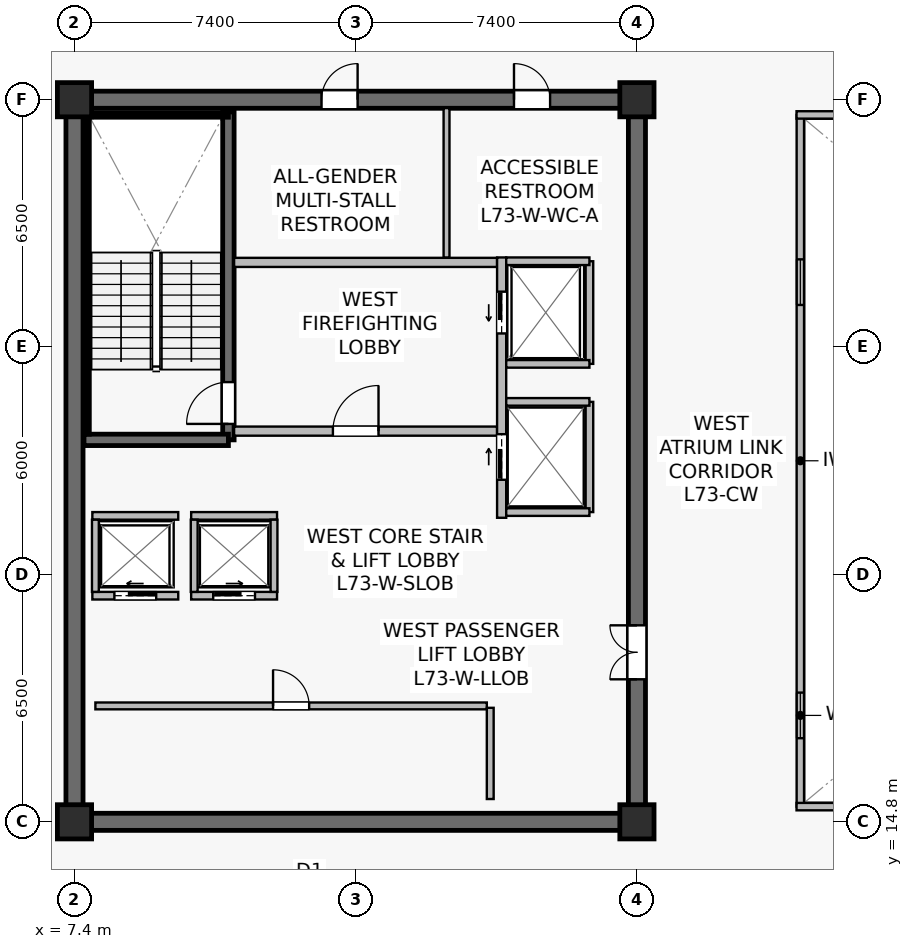
"""IFC4 building model, lengths in metres.
Left out: names, types, materials, properties, quantities, classifications, styles, units other than length and angle.
Written with IfcOpenShell. Run it as: python <this file> out.ifc"""

import sys

from ifc_helpers import new_model, si_unit, direction, frame, frame_2d, origin, origin_2d, place, context, subcontext, project, spatial, rectangle, extrude, source, transform, mapped, element, fill, save


model = new_model("IFC4")
c1 = context("Model", 3, precision=1e-05, world=origin(), true_north=direction((0.0, 1.0)))
c2 = subcontext(c1, "Body", "Model", "MODEL_VIEW")
j1 = project(units=[si_unit("LENGTHUNIT", "METRE"), si_unit("PLANEANGLEUNIT", "RADIAN")], contexts=[c1])
p1 = place(None, origin())
s1 = spatial("IfcSite", under=j1, at=p1, CompositionType="ELEMENT")
p2 = place(p1, origin())
s2 = spatial("IfcBuilding", under=s1, at=p2, CompositionType="ELEMENT")
p3 = place(p2, frame((0.0, 0.0, 306.0)))
s3 = spatial("IfcBuildingStorey", under=s2, at=p3, CompositionType="ELEMENT", Elevation=306.0)
p4 = place(p3, frame((7.175, 14.8, 0.0), z_axis=(0.0, 0.0, 1.0), x_axis=(1.0, 0.0, 0.0)))
e1 = element("IfcWall", 1, at=p4, inside=s3, PredefinedType="SHEAR", context=c2, shape_type="SweptSolid", body=[
    extrude(rectangle(XDim=15.25, YDim=0.45, at=frame_2d((7.625, 0.0))), origin(), (0.0, 0.0, 1.0), 3.9),
])
p5 = place(p3, frame((7.175, 33.8, 0.0), z_axis=(0.0, 0.0, 1.0), x_axis=(1.0, 0.0, 0.0)))
e2 = element("IfcWall", 2, at=p5, inside=s3, PredefinedType="SHEAR", context=c2, shape_type="SweptSolid", body=[
    extrude(rectangle(XDim=15.25, YDim=0.45, at=frame_2d((7.625, 0.0))), origin(), (0.0, 0.0, 1.0), 3.9),
])
p6 = place(p5, frame((6.725, 0.0, 0.0)))
e3 = element("IfcOpeningElement", 3, at=p6, cuts=e2, PredefinedType="OPENING", context=c2, shape_type="SweptSolid", body=[
    extrude(rectangle(XDim=0.95, YDim=2.15, at=frame_2d((0.475, 1.075))), frame((0.0, 0.235, 0.0), z_axis=(0.0, -1.0, 0.0), x_axis=(1.0, 0.0, 0.0)), (0.0, 0.0, 1.0), 0.47),
])
p7 = place(p5, frame((11.79, 0.0, 0.0)))
e4 = element("IfcOpeningElement", 4, at=p7, cuts=e2, PredefinedType="OPENING", context=c2, shape_type="SweptSolid", body=[
    extrude(rectangle(XDim=0.95, YDim=2.15, at=frame_2d((0.475, 1.075))), frame((0.0, 0.235, 0.0), z_axis=(0.0, -1.0, 0.0), x_axis=(1.0, 0.0, 0.0)), (0.0, 0.0, 1.0), 0.47),
])
p8 = place(p3, frame((7.4, 15.025, 0.0), z_axis=(0.0, 0.0, 1.0), x_axis=(0.0, 1.0, 0.0)))
e5 = element("IfcWall", 5, at=p8, inside=s3, PredefinedType="SHEAR", context=c2, shape_type="SweptSolid", body=[
    extrude(rectangle(XDim=18.55, YDim=0.45, at=frame_2d((9.275, 0.0))), origin(), (0.0, 0.0, 1.0), 3.9),
])
p9 = place(p3, frame((22.2, 15.025, 0.0), z_axis=(0.0, 0.0, 1.0), x_axis=(0.0, 1.0, 0.0)))
e6 = element("IfcWall", 6, at=p9, inside=s3, PredefinedType="SHEAR", context=c2, shape_type="SweptSolid", body=[
    extrude(rectangle(XDim=18.55, YDim=0.45, at=frame_2d((9.275, 0.0))), origin(), (0.0, 0.0, 1.0), 3.9),
])
p10 = place(p9, frame((3.525, 0.0, 0.0)))
e7 = element("IfcOpeningElement", 7, at=p10, cuts=e6, PredefinedType="OPENING", context=c2, shape_type="SweptSolid", body=[
    extrude(rectangle(XDim=1.42, YDim=2.2, at=frame_2d((0.71, 1.1))), frame((0.0, 0.235, 0.0), z_axis=(0.0, -1.0, 0.0), x_axis=(1.0, 0.0, 0.0)), (0.0, 0.0, 1.0), 0.47),
])
p11 = place(p3, frame((11.45, 24.85, 0.0), z_axis=(0.0, 0.0, 1.0), x_axis=(0.0, 1.0, 0.0)))
e8 = element("IfcWall", 8, at=p11, inside=s3, PredefinedType="SHEAR", context=c2, shape_type="SweptSolid", body=[
    extrude(rectangle(XDim=8.63, YDim=0.3, at=frame_2d((4.315, 0.0))), origin(), (0.0, 0.0, 1.0), 3.9),
])
p12 = place(p11, frame((0.42, 0.0, 0.0)))
e9 = element("IfcOpeningElement", 9, at=p12, cuts=e8, PredefinedType="OPENING", context=c2, shape_type="SweptSolid", body=[
    extrude(rectangle(XDim=1.1, YDim=2.15, at=frame_2d((0.55, 1.075))), frame((0.0, 0.16, 0.0), z_axis=(0.0, -1.0, 0.0), x_axis=(1.0, 0.0, 0.0)), (0.0, 0.0, 1.0), 0.32),
])
p13 = place(p3, frame((7.65, 24.85, 0.0), z_axis=(0.0, 0.0, 1.0), x_axis=(1.0, 0.0, 0.0)))
e10 = element("IfcWall", 10, at=p13, inside=s3, PredefinedType="SHEAR", context=c2, shape_type="SweptSolid", body=[
    extrude(rectangle(XDim=3.8, YDim=0.3, at=frame_2d((1.9, 0.0))), origin(), (0.0, 0.0, 1.0), 3.9),
])
p14 = place(p3, frame((7.73, 33.4, 0.0), z_axis=(0.0, 0.0, 1.0), x_axis=(1.0, 0.0, 0.0)))
e11 = element("IfcWall", 11, at=p14, inside=s3, PredefinedType="SOLIDWALL", context=c2, shape_type="SweptSolid", body=[
    extrude(rectangle(XDim=3.72, YDim=0.12, at=frame_2d((1.86, 0.0))), origin(), (0.0, 0.0, 1.0), 3.9),
])
p15 = place(p3, frame((7.73, 25.0, 0.0), z_axis=(0.0, 0.0, 1.0), x_axis=(0.0, 1.0, 0.0)))
e12 = element("IfcWall", 12, at=p15, inside=s3, PredefinedType="SOLIDWALL", context=c2, shape_type="SweptSolid", body=[
    extrude(rectangle(XDim=8.32, YDim=0.12, at=frame_2d((4.16, 0.0))), origin(), (0.0, 0.0, 1.0), 3.9),
])
m1 = source(origin(), c2, "Body", "SweptSolid", [
    extrude(rectangle(XDim=0.9, YDim=0.9, at=origin_2d()), origin(), (0.0, 0.0, 1.0), 4.2),
])
for number, where, z_axis, x_axis in (
    (13, (7.4, 14.8, 0.0), (0.0, 0.0, 1.0), (1.0, 0.0, 0.0)),
    (14, (22.2, 14.8, 0.0), (0.0, 0.0, 1.0), (1.0, 0.0, 0.0)),
    (15, (7.4, 33.8, 0.0), (0.0, 0.0, 1.0), (1.0, 0.0, 0.0)),
    (16, (22.2, 33.8, 0.0), (0.0, 0.0, 1.0), (1.0, 0.0, 0.0)),
):
    element("IfcColumn", number, at=place(p3, frame(where, z_axis=z_axis, x_axis=x_axis)), inside=s3, PredefinedType="COLUMN", context=c2, shape_type="MappedRepresentation", body=[
        mapped(m1, transform((0.0, 0.0, 0.0), scale=1.0)),
    ])
p16 = place(p3, frame((11.6, 25.08, 0.0), z_axis=(0.0, 0.0, 1.0), x_axis=(1.0, 0.0, 0.0)))
e17 = element("IfcWall", 17, at=p16, inside=s3, PredefinedType="SOLIDWALL", context=c2, shape_type="SweptSolid", body=[
    extrude(rectangle(XDim=6.92, YDim=0.24, at=frame_2d((3.46, 0.0))), origin(), (0.0, 0.0, 1.0), 3.297),
])
p17 = place(p16, frame((2.6, 0.0, 0.0)))
e18 = element("IfcOpeningElement", 18, at=p17, cuts=e17, PredefinedType="OPENING", context=c2, shape_type="SweptSolid", body=[
    extrude(rectangle(XDim=1.2, YDim=2.16, at=frame_2d((0.6, 1.08))), frame((0.0, 0.13, 0.0), z_axis=(0.0, -1.0, 0.0), x_axis=(1.0, 0.0, 0.0)), (0.0, 0.0, 1.0), 0.26),
])
p18 = place(p3, frame((11.6, 29.52, 0.0), z_axis=(0.0, 0.0, 1.0), x_axis=(1.0, 0.0, 0.0)))
e19 = element("IfcWall", 19, at=p18, inside=s3, PredefinedType="SOLIDWALL", context=c2, shape_type="SweptSolid", body=[
    extrude(rectangle(XDim=6.92, YDim=0.24, at=frame_2d((3.46, 0.0))), origin(), (0.0, 0.0, 1.0), 3.297),
])
p19 = place(p3, frame((18.64, 22.8, 0.0), z_axis=(0.0, 0.0, 1.0), x_axis=(0.0, 1.0, 0.0)))
e20 = element("IfcWall", 20, at=p19, inside=s3, PredefinedType="SOLIDWALL", context=c2, shape_type="SweptSolid", body=[
    extrude(rectangle(XDim=6.85, YDim=0.24, at=frame_2d((3.425, 0.0))), origin(), (0.0, 0.0, 1.0), 3.035),
])
p20 = place(p19, frame((4.85, 0.0, 0.0)))
e21 = element("IfcOpeningElement", 21, at=p20, cuts=e20, PredefinedType="OPENING", context=c2, shape_type="SweptSolid", body=[
    extrude(rectangle(XDim=1.1, YDim=2.22, at=frame_2d((0.55, 1.11))), frame((0.0, 0.13, 0.0), z_axis=(0.0, -1.0, 0.0), x_axis=(1.0, 0.0, 0.0)), (0.0, 0.0, 1.0), 0.26),
])
p21 = place(p19, frame((1.0, 0.0, 0.0)))
e22 = element("IfcOpeningElement", 22, at=p21, cuts=e20, PredefinedType="OPENING", context=c2, shape_type="SweptSolid", body=[
    extrude(rectangle(XDim=1.2, YDim=2.22, at=frame_2d((0.6, 1.11))), frame((0.0, 0.13, 0.0), z_axis=(0.0, -1.0, 0.0), x_axis=(1.0, 0.0, 0.0)), (0.0, 0.0, 1.0), 0.26),
])
p22 = place(p3, frame((7.87, 20.75, 0.0), z_axis=(0.0, 0.0, 1.0), x_axis=(1.0, 0.0, 0.0)))
e23 = element("IfcWall", 23, at=p22, inside=s3, PredefinedType="SOLIDWALL", context=c2, shape_type="SweptSolid", body=[
    extrude(rectangle(XDim=2.26, YDim=0.2, at=frame_2d((1.13, 0.0))), origin(), (0.0, 0.0, 1.0), 3.9),
])
p23 = place(p22, frame((0.58, 0.0, 0.0)))
e24 = element("IfcOpeningElement", 24, at=p23, cuts=e23, PredefinedType="OPENING", context=c2, shape_type="SweptSolid", body=[
    extrude(rectangle(XDim=1.1, YDim=2.22, at=frame_2d((0.55, 1.11))), frame((0.0, 0.11, 0.0), z_axis=(0.0, -1.0, 0.0), x_axis=(1.0, 0.0, 0.0)), (0.0, 0.0, 1.0), 0.22),
])
p24 = place(p3, frame((7.87, 22.85, 0.0), z_axis=(0.0, 0.0, 1.0), x_axis=(1.0, 0.0, 0.0)))
e25 = element("IfcWall", 25, at=p24, inside=s3, PredefinedType="SOLIDWALL", context=c2, shape_type="SweptSolid", body=[
    extrude(rectangle(XDim=2.26, YDim=0.2, at=frame_2d((1.13, 0.0))), origin(), (0.0, 0.0, 1.0), 3.9),
])
p25 = place(p3, frame((7.95, 20.85, 0.0), z_axis=(0.0, 0.0, 1.0), x_axis=(0.0, 1.0, 0.0)))
e26 = element("IfcWall", 26, at=p25, inside=s3, PredefinedType="SOLIDWALL", context=c2, shape_type="SweptSolid", body=[
    extrude(rectangle(XDim=1.9, YDim=0.18, at=frame_2d((0.95, 0.0))), origin(), (0.0, 0.0, 1.0), 3.9),
])
p26 = place(p3, frame((10.47, 20.75, 0.0), z_axis=(0.0, 0.0, 1.0), x_axis=(1.0, 0.0, 0.0)))
e27 = element("IfcWall", 27, at=p26, inside=s3, PredefinedType="SOLIDWALL", context=c2, shape_type="SweptSolid", body=[
    extrude(rectangle(XDim=2.26, YDim=0.2, at=frame_2d((1.13, 0.0))), origin(), (0.0, 0.0, 1.0), 3.9),
])
p27 = place(p26, frame((0.58, 0.0, 0.0)))
e28 = element("IfcOpeningElement", 28, at=p27, cuts=e27, PredefinedType="OPENING", context=c2, shape_type="SweptSolid", body=[
    extrude(rectangle(XDim=1.1, YDim=2.22, at=frame_2d((0.55, 1.11))), frame((0.0, 0.11, 0.0), z_axis=(0.0, -1.0, 0.0), x_axis=(1.0, 0.0, 0.0)), (0.0, 0.0, 1.0), 0.22),
])
p28 = place(p3, frame((10.47, 22.85, 0.0), z_axis=(0.0, 0.0, 1.0), x_axis=(1.0, 0.0, 0.0)))
e29 = element("IfcWall", 29, at=p28, inside=s3, PredefinedType="SOLIDWALL", context=c2, shape_type="SweptSolid", body=[
    extrude(rectangle(XDim=2.26, YDim=0.2, at=frame_2d((1.13, 0.0))), origin(), (0.0, 0.0, 1.0), 3.9),
])
for number, where, z_axis, x_axis in (
    (30, (10.55, 20.85, 0.0), (0.0, 0.0, 1.0), (0.0, 1.0, 0.0)),
    (31, (12.65, 20.85, 0.0), (0.0, 0.0, 1.0), (0.0, 1.0, 0.0)),
):
    element("IfcWall", number, at=place(p3, frame(where, z_axis=z_axis, x_axis=x_axis)), inside=s3, PredefinedType="SOLIDWALL", context=c2, shape_type="SweptSolid", body=[
        extrude(rectangle(XDim=1.9, YDim=0.18, at=frame_2d((0.95, 0.0))), origin(), (0.0, 0.0, 1.0), 3.9),
    ])
p29 = place(p3, frame((20.95, 26.85, 0.0), z_axis=(0.0, 0.0, 1.0), x_axis=(0.0, 1.0, 0.0)))
e32 = element("IfcWall", 32, at=p29, inside=s3, PredefinedType="SOLIDWALL", context=c2, shape_type="SweptSolid", body=[
    extrude(rectangle(XDim=2.7, YDim=0.2, at=frame_2d((1.35, 0.0))), origin(), (0.0, 0.0, 1.0), 3.9),
])
p30 = place(p3, frame((18.76, 29.55, 0.0), z_axis=(0.0, 0.0, 1.0), x_axis=(1.0, 0.0, 0.0)))
e33 = element("IfcWall", 33, at=p30, inside=s3, PredefinedType="SOLIDWALL", context=c2, shape_type="SweptSolid", body=[
    extrude(rectangle(XDim=2.19, YDim=0.2, at=frame_2d((1.095, 0.0))), origin(), (0.0, 0.0, 1.0), 3.9),
])
p31 = place(p3, frame((18.76, 26.85, 0.0), z_axis=(0.0, 0.0, 1.0), x_axis=(1.0, 0.0, 0.0)))
e34 = element("IfcWall", 34, at=p31, inside=s3, PredefinedType="SOLIDWALL", context=c2, shape_type="SweptSolid", body=[
    extrude(rectangle(XDim=2.19, YDim=0.2, at=frame_2d((1.095, 0.0))), origin(), (0.0, 0.0, 1.0), 3.297),
])
p32 = place(p3, frame((20.95, 22.95, 0.0), z_axis=(0.0, 0.0, 1.0), x_axis=(0.0, 1.0, 0.0)))
e35 = element("IfcWall", 35, at=p32, inside=s3, PredefinedType="SOLIDWALL", context=c2, shape_type="SweptSolid", body=[
    extrude(rectangle(XDim=2.9, YDim=0.2, at=frame_2d((1.45, 0.0))), origin(), (0.0, 0.0, 1.0), 3.035),
])
for number, where, z_axis, x_axis in (
    (36, (18.76, 25.85, 0.0), (0.0, 0.0, 1.0), (1.0, 0.0, 0.0)),
    (37, (18.76, 22.95, 0.0), (0.0, 0.0, 1.0), (1.0, 0.0, 0.0)),
):
    element("IfcWall", number, at=place(p3, frame(where, z_axis=z_axis, x_axis=x_axis)), inside=s3, PredefinedType="SOLIDWALL", context=c2, shape_type="SweptSolid", body=[
        extrude(rectangle(XDim=2.19, YDim=0.2, at=frame_2d((1.095, 0.0))), origin(), (0.0, 0.0, 1.0), 3.9),
    ])
p33 = place(p3, frame((7.95, 17.85, 0.0), z_axis=(0.0, 0.0, 1.0), x_axis=(1.0, 0.0, 0.0)))
e38 = element("IfcWall", 38, at=p33, inside=s3, PredefinedType="SOLIDWALL", context=c2, shape_type="SweptSolid", body=[
    extrude(rectangle(XDim=10.3, YDim=0.18, at=frame_2d((5.15, 0.0))), origin(), (0.0, 0.0, 1.0), 3.297),
])
p34 = place(p33, frame((4.675, 0.0, 0.0)))
e39 = element("IfcOpeningElement", 39, at=p34, cuts=e38, PredefinedType="OPENING", context=c2, shape_type="SweptSolid", body=[
    extrude(rectangle(XDim=0.95, YDim=2.15, at=frame_2d((0.475, 1.075))), frame((0.0, 0.1, 0.0), z_axis=(0.0, -1.0, 0.0), x_axis=(1.0, 0.0, 0.0)), (0.0, 0.0, 1.0), 0.2),
])
p35 = place(p3, frame((18.34, 15.4, 0.0), z_axis=(0.0, 0.0, 1.0), x_axis=(0.0, 1.0, 0.0)))
e40 = element("IfcWall", 40, at=p35, inside=s3, PredefinedType="SOLIDWALL", context=c2, shape_type="SweptSolid", body=[
    extrude(rectangle(XDim=2.4, YDim=0.18, at=frame_2d((1.2, 0.0))), origin(), (0.0, 0.0, 1.0), 3.9),
])
p36 = place(p3, frame((17.19, 29.65, 0.0), z_axis=(0.0, 0.0, 1.0), x_axis=(0.0, 1.0, 0.0)))
e41 = element("IfcWall", 41, at=p36, inside=s3, PredefinedType="PLUMBINGWALL", context=c2, shape_type="SweptSolid", body=[
    extrude(rectangle(XDim=3.93, YDim=0.155, at=frame_2d((1.965, 0.0))), origin(), (0.0, 0.0, 1.0), 3.9),
])
p37 = place(p3, frame((26.5, 15.2, 0.0), z_axis=(0.0, 0.0, 1.0), x_axis=(0.0, 1.0, 0.0)))
e42 = element("IfcWall", 42, at=p37, inside=s3, PredefinedType="SOLIDWALL", context=c2, shape_type="SweptSolid", body=[
    extrude(rectangle(XDim=18.2, YDim=0.195, at=frame_2d((9.1, 0.0))), origin(), (0.0, 0.0, 1.0), 3.9),
])
p38 = place(p37, frame((1.8, 0.0, 0.9)))
e43 = element("IfcOpeningElement", 43, at=p38, cuts=e42, PredefinedType="OPENING", context=c2, shape_type="SweptSolid", body=[
    extrude(rectangle(XDim=1.2, YDim=1.35, at=frame_2d((0.6, 0.675))), frame((0.0, 0.107, 0.0), z_axis=(0.0, -1.0, 0.0), x_axis=(1.0, 0.0, 0.0)), (0.0, 0.0, 1.0), 0.215),
])
p39 = place(p37, frame((13.2, 0.0, 0.9)))
e44 = element("IfcOpeningElement", 44, at=p39, cuts=e42, PredefinedType="OPENING", context=c2, shape_type="SweptSolid", body=[
    extrude(rectangle(XDim=1.2, YDim=1.35, at=frame_2d((0.6, 0.675))), frame((0.0, 0.107, 0.0), z_axis=(0.0, -1.0, 0.0), x_axis=(1.0, 0.0, 0.0)), (0.0, 0.0, 1.0), 0.215),
])
for number, where, z_axis, x_axis in (
    (45, (26.4, 15.2, 0.0), (0.0, 0.0, 1.0), (1.0, 0.0, 0.0)),
    (46, (26.4, 33.4, 0.0), (0.0, 0.0, 1.0), (1.0, 0.0, 0.0)),
):
    element("IfcWall", number, at=place(p3, frame(where, z_axis=z_axis, x_axis=x_axis)), inside=s3, PredefinedType="SOLIDWALL", context=c2, shape_type="SweptSolid", body=[
        extrude(rectangle(XDim=22.0, YDim=0.195, at=frame_2d((11.0, 0.0))), origin(), (0.0, 0.0, 1.0), 3.9),
    ])
m2 = source(origin(), c2, "Body", "SweptSolid", [
    extrude(rectangle(XDim=1.2, YDim=1.35, at=frame_2d((0.6, 0.675))), frame((0.0, 0.03, 0.0), z_axis=(0.0, -1.0, 0.0), x_axis=(1.0, 0.0, 0.0)), (0.0, 0.0, 1.0), 0.06),
])
p40 = place(p38, origin())
e47 = element("IfcWindow", 47, at=p40, inside=s3, PartitioningType="SINGLE_PANEL", PredefinedType="WINDOW", context=c2, shape_type="MappedRepresentation", body=[
    mapped(m2, transform((0.0, 0.0, 0.0), scale=1.0)),
])
fill(e43, e47)
p41 = place(p39, origin())
e48 = element("IfcWindow", 48, at=p41, inside=s3, PartitioningType="SINGLE_PANEL", PredefinedType="WINDOW", context=c2, shape_type="MappedRepresentation", body=[
    mapped(m2, transform((0.0, 0.0, 0.0), scale=1.0)),
])
fill(e44, e48)
m3 = source(origin(), c2, "Body", "SweptSolid", [
    extrude(rectangle(XDim=1.1, YDim=2.15, at=frame_2d((0.55, 1.075))), frame((0.0, 0.025, 0.0), z_axis=(0.0, -1.0, 0.0), x_axis=(1.0, 0.0, 0.0)), (0.0, 0.0, 1.0), 0.05),
])
p42 = place(p12, origin())
e49 = element("IfcDoor", 49, at=p42, inside=s3, OperationType="SINGLE_SWING_LEFT", PredefinedType="DOOR", context=c2, shape_type="MappedRepresentation", body=[
    mapped(m3, transform((0.0, 0.0, 0.0), scale=1.0)),
])
fill(e9, e49)
m4 = source(origin(), c2, "Body", "SweptSolid", [
    extrude(rectangle(XDim=1.2, YDim=2.16, at=frame_2d((0.6, 1.08))), frame((0.0, 0.025, 0.0), z_axis=(0.0, -1.0, 0.0), x_axis=(1.0, 0.0, 0.0)), (0.0, 0.0, 1.0), 0.05),
])
p43 = place(p17, origin())
e50 = element("IfcDoor", 50, at=p43, inside=s3, OperationType="SINGLE_SWING_RIGHT", PredefinedType="DOOR", context=c2, shape_type="MappedRepresentation", body=[
    mapped(m4, transform((0.0, 0.0, 0.0), scale=1.0)),
])
fill(e18, e50)
m5 = source(origin(), c2, "Body", "SweptSolid", [
    extrude(rectangle(XDim=1.1, YDim=2.22, at=frame_2d((0.55, 1.11))), frame((0.0, 0.025, 0.0), z_axis=(0.0, -1.0, 0.0), x_axis=(1.0, 0.0, 0.0)), (0.0, 0.0, 1.0), 0.05),
])
p44 = place(p23, origin())
e51 = element("IfcDoor", 51, at=p44, inside=s3, OperationType="SLIDING_TO_LEFT", PredefinedType="USERDEFINED", context=c2, shape_type="MappedRepresentation", body=[
    mapped(m5, transform((0.0, 0.0, 0.0), scale=1.0)),
])
fill(e24, e51)
p45 = place(p27, origin())
e52 = element("IfcDoor", 52, at=p45, inside=s3, OperationType="SLIDING_TO_RIGHT", PredefinedType="USERDEFINED", context=c2, shape_type="MappedRepresentation", body=[
    mapped(m5, transform((0.0, 0.0, 0.0), scale=1.0)),
])
fill(e28, e52)
p46 = place(p20, origin())
e53 = element("IfcDoor", 53, at=p46, inside=s3, OperationType="SLIDING_TO_LEFT", PredefinedType="USERDEFINED", context=c2, shape_type="MappedRepresentation", body=[
    mapped(m5, transform((0.0, 0.0, 0.0), scale=1.0)),
])
fill(e21, e53)
m6 = source(origin(), c2, "Body", "SweptSolid", [
    extrude(rectangle(XDim=1.2, YDim=2.22, at=frame_2d((0.6, 1.11))), frame((0.0, 0.025, 0.0), z_axis=(0.0, -1.0, 0.0), x_axis=(1.0, 0.0, 0.0)), (0.0, 0.0, 1.0), 0.05),
])
p47 = place(p21, origin())
e54 = element("IfcDoor", 54, at=p47, inside=s3, OperationType="SLIDING_TO_RIGHT", PredefinedType="USERDEFINED", context=c2, shape_type="MappedRepresentation", body=[
    mapped(m6, transform((0.0, 0.0, 0.0), scale=1.0)),
])
fill(e22, e54)
m7 = source(origin(), c2, "Body", "SweptSolid", [
    extrude(rectangle(XDim=0.95, YDim=2.15, at=frame_2d((0.475, 1.075))), frame((0.0, 0.025, 0.0), z_axis=(0.0, -1.0, 0.0), x_axis=(1.0, 0.0, 0.0)), (0.0, 0.0, 1.0), 0.05),
])
p48 = place(p34, origin())
e55 = element("IfcDoor", 55, at=p48, inside=s3, OperationType="SINGLE_SWING_LEFT", PredefinedType="DOOR", context=c2, shape_type="MappedRepresentation", body=[
    mapped(m7, transform((0.0, 0.0, 0.0), scale=1.0)),
])
fill(e39, e55)
m8 = source(origin(), c2, "Body", "SweptSolid", [
    extrude(rectangle(XDim=1.42, YDim=2.2, at=frame_2d((0.71, 1.1))), frame((0.0, 0.025, 0.0), z_axis=(0.0, -1.0, 0.0), x_axis=(1.0, 0.0, 0.0)), (0.0, 0.0, 1.0), 0.05),
])
p49 = place(p10, origin())
e56 = element("IfcDoor", 56, at=p49, inside=s3, OperationType="DOUBLE_DOOR_SINGLE_SWING", PredefinedType="DOOR", context=c2, shape_type="MappedRepresentation", body=[
    mapped(m8, transform((0.0, 0.0, 0.0), scale=1.0)),
])
fill(e7, e56)
p50 = place(p6, origin())
e57 = element("IfcDoor", 57, at=p50, inside=s3, OperationType="SINGLE_SWING_RIGHT", PredefinedType="DOOR", context=c2, shape_type="MappedRepresentation", body=[
    mapped(m7, transform((0.0, 0.0, 0.0), scale=1.0)),
])
fill(e3, e57)
p51 = place(p7, origin())
e58 = element("IfcDoor", 58, at=p51, inside=s3, OperationType="SINGLE_SWING_LEFT", PredefinedType="DOOR", context=c2, shape_type="MappedRepresentation", body=[
    mapped(m7, transform((0.0, 0.0, 0.0), scale=1.0)),
])
fill(e4, e58)
save(model, sys.argv[1])
